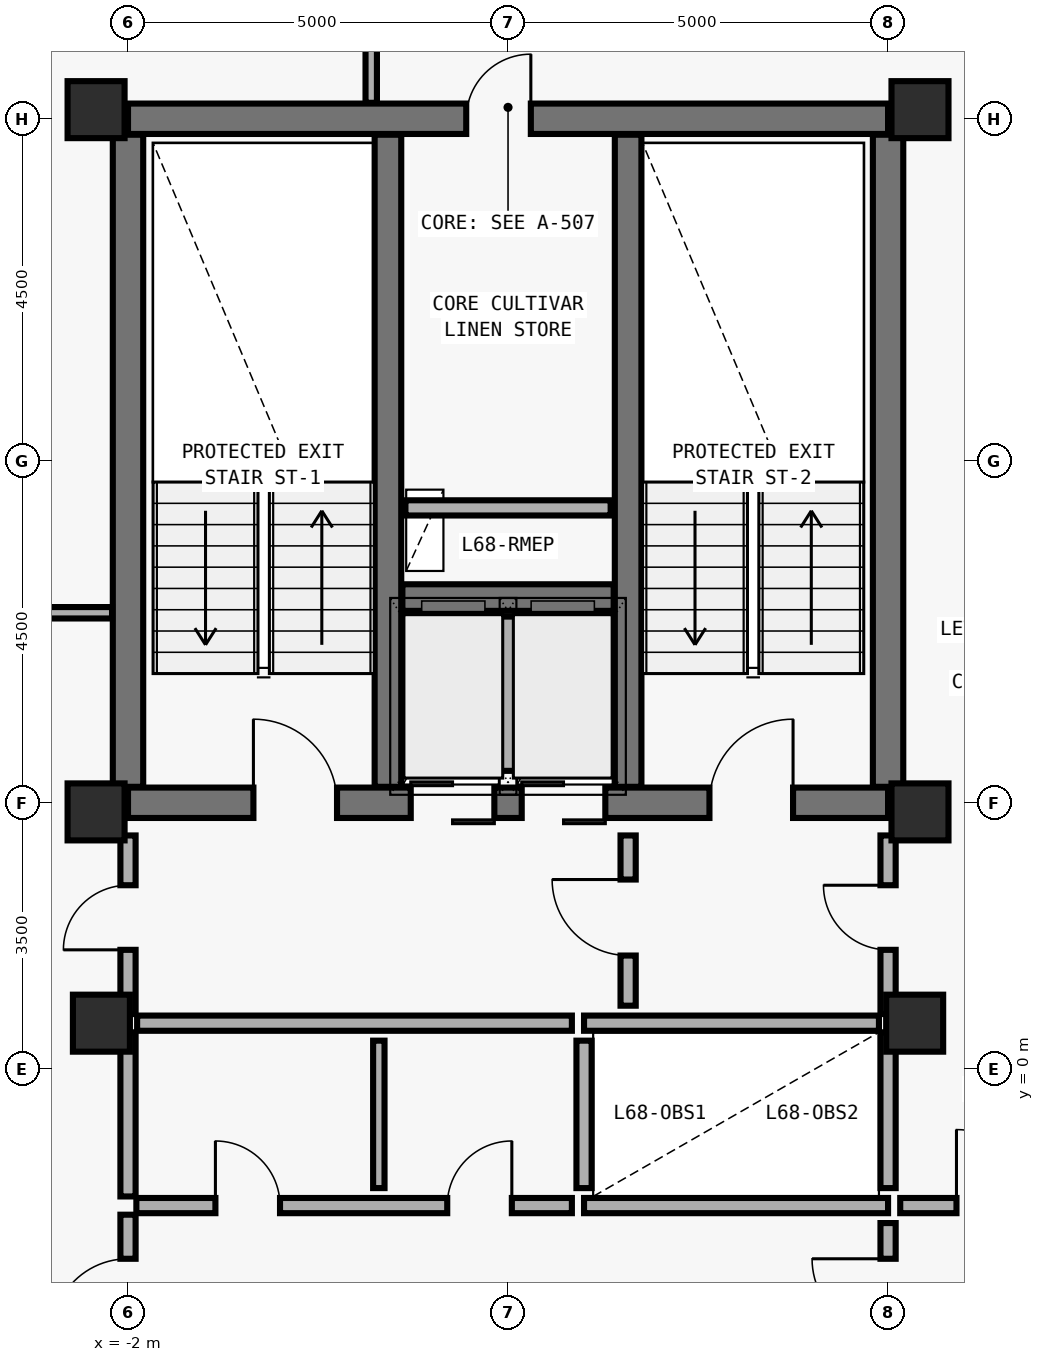
"""IFC4 building model, lengths in metres.
Left out: names, types, materials, properties, quantities, classifications, styles, units other than length and angle.
Written with IfcOpenShell. Run it as: python <this file> out.ifc"""

import sys

from ifc_helpers import new_model, si_unit, direction, frame, frame_2d, origin, origin_2d, place, context, subcontext, project, spatial, rectangle, extrude, element, fill, save


model = new_model("IFC4")
c1 = context("Model", 3, precision=1e-05, world=origin(), true_north=direction((0.0, 1.0)))
c2 = subcontext(c1, "Body", "Model", "MODEL_VIEW")
j1 = project(units=[si_unit("LENGTHUNIT", "METRE"), si_unit("PLANEANGLEUNIT", "RADIAN")], contexts=[c1])
p1 = place(None, origin())
s1 = spatial("IfcSite", under=j1, at=p1, CompositionType="ELEMENT")
p2 = place(p1, origin())
s2 = spatial("IfcBuilding", under=s1, at=p2, CompositionType="ELEMENT")
p3 = place(p2, frame((0.0, 0.0, 267.0)))
s3 = spatial("IfcBuildingStorey", under=s2, at=p3, CompositionType="ELEMENT", Elevation=267.0)
p4 = place(p3, frame((-2.0, 3.5, 0.0), z_axis=(0.0, 0.0, 1.0), x_axis=(1.0, 0.0, 0.0)))
e1 = element("IfcWall", 1, at=p4, inside=s3, PredefinedType="SHEAR", context=c2, shape_type="SweptSolid", body=[
    extrude(rectangle(XDim=10.0, YDim=0.4, at=frame_2d((5.0, 0.0))), origin(), (0.0, 0.0, 1.0), 3.592),
])
p5 = place(p4, frame((1.65, 0.0, 0.0)))
e2 = element("IfcOpeningElement", 2, at=p5, cuts=e1, PredefinedType="OPENING", context=c2, shape_type="SweptSolid", body=[
    extrude(rectangle(XDim=1.1, YDim=2.15, at=frame_2d((0.55, 1.075))), frame((0.0, 0.21, 0.0), z_axis=(0.0, -1.0, 0.0), x_axis=(1.0, 0.0, 0.0)), (0.0, 0.0, 1.0), 0.42),
])
p6 = place(p4, frame((7.65, 0.0, 0.0)))
e3 = element("IfcOpeningElement", 3, at=p6, cuts=e1, PredefinedType="OPENING", context=c2, shape_type="SweptSolid", body=[
    extrude(rectangle(XDim=1.1, YDim=2.15, at=frame_2d((0.55, 1.075))), frame((0.0, 0.21, 0.0), z_axis=(0.0, -1.0, 0.0), x_axis=(1.0, 0.0, 0.0)), (0.0, 0.0, 1.0), 0.42),
])
p7 = place(p4, frame((3.72, 0.0, 0.0)))
e4 = element("IfcOpeningElement", 4, at=p7, cuts=e1, PredefinedType="OPENING", context=c2, shape_type="SweptSolid", body=[
    extrude(rectangle(XDim=1.1, YDim=2.2, at=frame_2d((0.55, 1.1))), frame((0.0, 0.21, 0.0), z_axis=(0.0, -1.0, 0.0), x_axis=(1.0, 0.0, 0.0)), (0.0, 0.0, 1.0), 0.42),
])
p8 = place(p4, frame((5.18, 0.0, 0.0)))
e5 = element("IfcOpeningElement", 5, at=p8, cuts=e1, PredefinedType="OPENING", context=c2, shape_type="SweptSolid", body=[
    extrude(rectangle(XDim=1.1, YDim=2.2, at=frame_2d((0.55, 1.1))), frame((0.0, 0.21, 0.0), z_axis=(0.0, -1.0, 0.0), x_axis=(1.0, 0.0, 0.0)), (0.0, 0.0, 1.0), 0.42),
])
p9 = place(p3, frame((-2.0, 12.5, 0.0), z_axis=(0.0, 0.0, 1.0), x_axis=(1.0, 0.0, 0.0)))
e6 = element("IfcWall", 6, at=p9, inside=s3, PredefinedType="SHEAR", context=c2, shape_type="SweptSolid", body=[
    extrude(rectangle(XDim=10.0, YDim=0.4, at=frame_2d((5.0, 0.0))), origin(), (0.0, 0.0, 1.0), 3.592),
])
p10 = place(p9, frame((4.45, 0.0, 0.0)))
e7 = element("IfcOpeningElement", 7, at=p10, cuts=e6, PredefinedType="OPENING", context=c2, shape_type="SweptSolid", body=[
    extrude(rectangle(XDim=0.85, YDim=2.1, at=frame_2d((0.425, 1.05))), frame((0.0, 0.21, 0.0), z_axis=(0.0, -1.0, 0.0), x_axis=(1.0, 0.0, 0.0)), (0.0, 0.0, 1.0), 0.42),
])
for number, where, z_axis, x_axis in (
    (8, (-2.0, 3.71, 0.0), (0.0, 0.0, 1.0), (0.0, 1.0, 0.0)),
    (9, (8.0, 3.71, 0.0), (0.0, 0.0, 1.0), (0.0, 1.0, 0.0)),
):
    element("IfcWall", number, at=place(p3, frame(where, z_axis=z_axis, x_axis=x_axis)), inside=s3, PredefinedType="SHEAR", context=c2, shape_type="SweptSolid", body=[
        extrude(rectangle(XDim=8.58, YDim=0.4, at=frame_2d((4.29, 0.0))), origin(), (0.0, 0.0, 1.0), 3.592),
    ])
for number, where, z_axis, x_axis in (
    (10, (1.42, 3.71, 0.0), (0.0, 0.0, 1.0), (0.0, 1.0, 0.0)),
    (11, (4.58, 3.71, 0.0), (0.0, 0.0, 1.0), (0.0, 1.0, 0.0)),
):
    element("IfcWall", number, at=place(p3, frame(where, z_axis=z_axis, x_axis=x_axis)), inside=s3, PredefinedType="SHEAR", context=c2, shape_type="SweptSolid", body=[
        extrude(rectangle(XDim=8.58, YDim=0.35, at=frame_2d((4.29, 0.0))), origin(), (0.0, 0.0, 1.0), 3.592),
    ])
p11 = place(p3, frame((1.61, 6.2, 0.0), z_axis=(0.0, 0.0, 1.0), x_axis=(1.0, 0.0, 0.0)))
e12 = element("IfcWall", 12, at=p11, inside=s3, PredefinedType="SHEAR", context=c2, shape_type="SweptSolid", body=[
    extrude(rectangle(XDim=2.78, YDim=0.35, at=frame_2d((1.39, 0.0))), origin(), (0.0, 0.0, 1.0), 3.592),
])
for number, where, z_axis, x_axis in (
    (13, (-2.42, 12.62, 0.0), (0.0, 0.0, 1.0), (1.0, 0.0, 0.0)),
    (14, (8.42, 12.62, 0.0), (0.0, 0.0, 1.0), (1.0, 0.0, 0.0)),
    (15, (-2.42, 3.38, 0.0), (0.0, 0.0, 1.0), (1.0, 0.0, 0.0)),
    (16, (8.42, 3.38, 0.0), (0.0, 0.0, 1.0), (1.0, 0.0, 0.0)),
    (17, (-2.35, 0.6, 0.0), (0.0, 0.0, 1.0), (1.0, 0.0, 0.0)),
    (18, (8.35, 0.6, 0.0), (0.0, 0.0, 1.0), (1.0, 0.0, 0.0)),
):
    element("IfcColumn", number, at=place(p3, frame(where, z_axis=z_axis, x_axis=x_axis)), inside=s3, PredefinedType="COLUMN", context=c2, shape_type="SweptSolid", body=[
        extrude(rectangle(XDim=0.75, YDim=0.75, at=origin_2d()), origin(), (0.0, 0.0, 1.0), 3.575),
    ])
p12 = place(p3, frame((3.0, 3.92, 0.0), z_axis=(0.0, 0.0, 1.0), x_axis=(0.0, 1.0, 0.0)))
e19 = element("IfcWall", 19, at=p12, inside=s3, PredefinedType="SOLIDWALL", context=c2, shape_type="SweptSolid", body=[
    extrude(rectangle(XDim=2.03, YDim=0.2, at=frame_2d((1.015, 0.0))), origin(), (0.0, 0.0, 1.0), 3.36),
])
p13 = place(p3, frame((1.65, 7.38, 0.0), z_axis=(0.0, 0.0, 1.0), x_axis=(1.0, 0.0, 0.0)))
e20 = element("IfcWall", 20, at=p13, inside=s3, PredefinedType="SOLIDWALL", context=c2, shape_type="SweptSolid", body=[
    extrude(rectangle(XDim=2.7, YDim=0.2, at=frame_2d((1.35, 0.0))), origin(), (0.0, 0.0, 1.0), 3.36),
])
p14 = place(p3, frame((4.0, 0.6, 0.0), z_axis=(0.0, 0.0, 1.0), x_axis=(1.0, 0.0, 0.0)))
e21 = element("IfcWall", 21, at=p14, inside=s3, PredefinedType="SOLIDWALL", context=c2, shape_type="SweptSolid", body=[
    extrude(rectangle(XDim=3.88, YDim=0.2, at=frame_2d((1.94, 0.0))), origin(), (0.0, 0.0, 1.0), 3.072),
])
p15 = place(p3, frame((4.0, -1.8, 0.0), z_axis=(0.0, 0.0, 1.0), x_axis=(1.0, 0.0, 0.0)))
e22 = element("IfcWall", 22, at=p15, inside=s3, PredefinedType="SOLIDWALL", context=c2, shape_type="SweptSolid", body=[
    extrude(rectangle(XDim=4.0, YDim=0.2, at=frame_2d((2.0, 0.0))), origin(), (0.0, 0.0, 1.0), 3.36),
])
p16 = place(p3, frame((4.0, -1.57, 0.0), z_axis=(0.0, 0.0, 1.0), x_axis=(0.0, 1.0, 0.0)))
e23 = element("IfcWall", 23, at=p16, inside=s3, PredefinedType="SOLIDWALL", context=c2, shape_type="SweptSolid", body=[
    extrude(rectangle(XDim=1.94, YDim=0.2, at=frame_2d((0.97, 0.0))), origin(), (0.0, 0.0, 1.0), 3.36),
])
p17 = place(p3, frame((8.0, -1.57, 0.0), z_axis=(0.0, 0.0, 1.0), x_axis=(0.0, 1.0, 0.0)))
e24 = element("IfcWall", 24, at=p17, inside=s3, PredefinedType="SOLIDWALL", context=c2, shape_type="SweptSolid", body=[
    extrude(rectangle(XDim=2.05, YDim=0.2, at=frame_2d((1.025, 0.0))), origin(), (0.0, 0.0, 1.0), 3.072),
])
p18 = place(p3, frame((4.58, 0.83, 0.0), z_axis=(0.0, 0.0, 1.0), x_axis=(0.0, 1.0, 0.0)))
e25 = element("IfcWall", 25, at=p18, inside=s3, PredefinedType="MOVABLE", context=c2, shape_type="SweptSolid", body=[
    extrude(rectangle(XDim=2.24, YDim=0.2, at=frame_2d((1.12, 0.0))), origin(), (0.0, 0.0, 1.0), 3.36),
])
p19 = place(p18, frame((0.66, 0.0, 0.0)))
e26 = element("IfcOpeningElement", 26, at=p19, cuts=e25, PredefinedType="OPENING", context=c2, shape_type="SweptSolid", body=[
    extrude(rectangle(XDim=1.0, YDim=2.1, at=frame_2d((0.5, 1.05))), frame((0.0, 0.11, 0.0), z_axis=(0.0, -1.0, 0.0), x_axis=(1.0, 0.0, 0.0)), (0.0, 0.0, 1.0), 0.22),
])
p20 = place(p3, frame((-2.0, 0.72, 0.0), z_axis=(0.0, 0.0, 1.0), x_axis=(0.0, 1.0, 0.0)))
e27 = element("IfcWall", 27, at=p20, inside=s3, PredefinedType="MOVABLE", context=c2, shape_type="SweptSolid", body=[
    extrude(rectangle(XDim=2.35, YDim=0.2, at=frame_2d((1.175, 0.0))), origin(), (0.0, 0.0, 1.0), 2.692),
])
p21 = place(p20, frame((0.845, 0.0, 0.0)))
e28 = element("IfcOpeningElement", 28, at=p21, cuts=e27, PredefinedType="OPENING", context=c2, shape_type="SweptSolid", body=[
    extrude(rectangle(XDim=0.85, YDim=2.1, at=frame_2d((0.425, 1.05))), frame((0.0, 0.11, 0.0), z_axis=(0.0, -1.0, 0.0), x_axis=(1.0, 0.0, 0.0)), (0.0, 0.0, 1.0), 0.22),
])
p22 = place(p3, frame((8.0, 0.72, 0.0), z_axis=(0.0, 0.0, 1.0), x_axis=(0.0, 1.0, 0.0)))
e29 = element("IfcWall", 29, at=p22, inside=s3, PredefinedType="MOVABLE", context=c2, shape_type="SweptSolid", body=[
    extrude(rectangle(XDim=2.35, YDim=0.2, at=frame_2d((1.175, 0.0))), origin(), (0.0, 0.0, 1.0), 2.692),
])
p23 = place(p22, frame((0.845, 0.0, 0.0)))
e30 = element("IfcOpeningElement", 30, at=p23, cuts=e29, PredefinedType="OPENING", context=c2, shape_type="SweptSolid", body=[
    extrude(rectangle(XDim=0.85, YDim=2.1, at=frame_2d((0.425, 1.05))), frame((0.0, 0.11, 0.0), z_axis=(0.0, -1.0, 0.0), x_axis=(1.0, 0.0, 0.0)), (0.0, 0.0, 1.0), 0.22),
])
p24 = place(p3, frame((-2.0, -4.08, 0.0), z_axis=(0.0, 0.0, 1.0), x_axis=(0.0, 1.0, 0.0)))
e31 = element("IfcWall", 31, at=p24, inside=s3, PredefinedType="MOVABLE", context=c2, shape_type="SweptSolid", body=[
    extrude(rectangle(XDim=2.16, YDim=0.2, at=frame_2d((1.08, 0.0))), origin(), (0.0, 0.0, 1.0), 3.072),
])
p25 = place(p24, frame((0.58, 0.0, 0.0)))
e32 = element("IfcOpeningElement", 32, at=p25, cuts=e31, PredefinedType="OPENING", context=c2, shape_type="SweptSolid", body=[
    extrude(rectangle(XDim=1.0, YDim=2.1, at=frame_2d((0.5, 1.05))), frame((0.0, 0.11, 0.0), z_axis=(0.0, -1.0, 0.0), x_axis=(1.0, 0.0, 0.0)), (0.0, 0.0, 1.0), 0.22),
])
p26 = place(p3, frame((8.0, -3.97, 0.0), z_axis=(0.0, 0.0, 1.0), x_axis=(0.0, 1.0, 0.0)))
e33 = element("IfcWall", 33, at=p26, inside=s3, PredefinedType="MOVABLE", context=c2, shape_type="SweptSolid", body=[
    extrude(rectangle(XDim=1.94, YDim=0.2, at=frame_2d((0.97, 0.0))), origin(), (0.0, 0.0, 1.0), 3.072),
])
p27 = place(p26, frame((0.47, 0.0, 0.0)))
e34 = element("IfcOpeningElement", 34, at=p27, cuts=e33, PredefinedType="OPENING", context=c2, shape_type="SweptSolid", body=[
    extrude(rectangle(XDim=1.0, YDim=2.1, at=frame_2d((0.5, 1.05))), frame((0.0, 0.11, 0.0), z_axis=(0.0, -1.0, 0.0), x_axis=(1.0, 0.0, 0.0)), (0.0, 0.0, 1.0), 0.22),
])
p28 = place(p3, frame((-1.89, -1.8, 0.0), z_axis=(0.0, 0.0, 1.0), x_axis=(1.0, 0.0, 0.0)))
e35 = element("IfcWall", 35, at=p28, inside=s3, PredefinedType="MOVABLE", context=c2, shape_type="SweptSolid", body=[
    extrude(rectangle(XDim=5.73, YDim=0.2, at=frame_2d((2.865, 0.0))), origin(), (0.0, 0.0, 1.0), 3.36),
])
p29 = place(p28, frame((1.04, 0.0, 0.0)))
e36 = element("IfcOpeningElement", 36, at=p29, cuts=e35, PredefinedType="OPENING", context=c2, shape_type="SweptSolid", body=[
    extrude(rectangle(XDim=0.85, YDim=2.1, at=frame_2d((0.425, 1.05))), frame((0.0, 0.11, 0.0), z_axis=(0.0, -1.0, 0.0), x_axis=(1.0, 0.0, 0.0)), (0.0, 0.0, 1.0), 0.22),
])
p30 = place(p28, frame((4.09, 0.0, 0.0)))
e37 = element("IfcOpeningElement", 37, at=p30, cuts=e35, PredefinedType="OPENING", context=c2, shape_type="SweptSolid", body=[
    extrude(rectangle(XDim=0.85, YDim=2.1, at=frame_2d((0.425, 1.05))), frame((0.0, 0.11, 0.0), z_axis=(0.0, -1.0, 0.0), x_axis=(1.0, 0.0, 0.0)), (0.0, 0.0, 1.0), 0.22),
])
p31 = place(p3, frame((8.16, -1.8, 0.0), z_axis=(0.0, 0.0, 1.0), x_axis=(1.0, 0.0, 0.0)))
e38 = element("IfcWall", 38, at=p31, inside=s3, PredefinedType="MOVABLE", context=c2, shape_type="SweptSolid", body=[
    extrude(rectangle(XDim=2.64, YDim=0.2, at=frame_2d((1.32, 0.0))), origin(), (0.0, 0.0, 1.0), 3.36),
])
p32 = place(p31, frame((0.74, 0.0, 0.0)))
e39 = element("IfcOpeningElement", 39, at=p32, cuts=e38, PredefinedType="OPENING", context=c2, shape_type="SweptSolid", body=[
    extrude(rectangle(XDim=1.0, YDim=2.1, at=frame_2d((0.5, 1.05))), frame((0.0, 0.11, 0.0), z_axis=(0.0, -1.0, 0.0), x_axis=(1.0, 0.0, 0.0)), (0.0, 0.0, 1.0), 0.22),
])
p33 = place(p3, frame((-1.88, 0.6, 0.0), z_axis=(0.0, 0.0, 1.0), x_axis=(1.0, 0.0, 0.0)))
e40 = element("IfcWall", 40, at=p33, inside=s3, PredefinedType="MOVABLE", context=c2, shape_type="SweptSolid", body=[
    extrude(rectangle(XDim=5.72, YDim=0.2, at=frame_2d((2.86, 0.0))), origin(), (0.0, 0.0, 1.0), 3.072),
])
p34 = place(p3, frame((1.3, -1.57, 0.0), z_axis=(0.0, 0.0, 1.0), x_axis=(0.0, 1.0, 0.0)))
e41 = element("IfcWall", 41, at=p34, inside=s3, PredefinedType="PARTITIONING", context=c2, shape_type="SweptSolid", body=[
    extrude(rectangle(XDim=1.94, YDim=0.15, at=frame_2d((0.97, 0.0))), origin(), (0.0, 0.0, 1.0), 3.36),
])
p35 = place(p3, frame((-2.0, -1.68, 0.0), z_axis=(0.0, 0.0, 1.0), x_axis=(0.0, 1.0, 0.0)))
e42 = element("IfcWall", 42, at=p35, inside=s3, PredefinedType="MOVABLE", context=c2, shape_type="SweptSolid", body=[
    extrude(rectangle(XDim=2.16, YDim=0.2, at=frame_2d((1.08, 0.0))), origin(), (0.0, 0.0, 1.0), 3.072),
])
p36 = place(p3, frame((1.2, 14.615, 0.0), z_axis=(0.0, 0.0, 1.0), x_axis=(0.0, -1.0, 0.0)))
e43 = element("IfcWall", 43, at=p36, inside=s3, PredefinedType="PARTITIONING", context=c2, shape_type="SweptSolid", body=[
    extrude(rectangle(XDim=1.905, YDim=0.15, at=frame_2d((0.953, 0.0))), origin(), (0.0, 0.0, 1.0), 3.36),
])
p37 = place(p3, frame((-2.21, 6.0, 0.0), z_axis=(0.0, 0.0, 1.0), x_axis=(-1.0, 0.0, 0.0)))
e44 = element("IfcWall", 44, at=p37, inside=s3, PredefinedType="PARTITIONING", context=c2, shape_type="SweptSolid", body=[
    extrude(rectangle(XDim=2.39, YDim=0.15, at=frame_2d((1.195, 0.0))), origin(), (0.0, 0.0, 1.0), 3.36),
])
p38 = place(p5, origin())
e45 = element("IfcDoor", 45, at=p38, inside=s3, OperationType="SINGLE_SWING_LEFT", PredefinedType="DOOR", context=c2, shape_type="SweptSolid", body=[
    extrude(rectangle(XDim=1.1, YDim=2.15, at=frame_2d((0.55, 1.075))), frame((0.0, 0.025, 0.0), z_axis=(0.0, -1.0, 0.0), x_axis=(1.0, 0.0, 0.0)), (0.0, 0.0, 1.0), 0.05),
])
fill(e2, e45)
p39 = place(p6, origin())
e46 = element("IfcDoor", 46, at=p39, inside=s3, OperationType="SINGLE_SWING_RIGHT", PredefinedType="DOOR", context=c2, shape_type="SweptSolid", body=[
    extrude(rectangle(XDim=1.1, YDim=2.15, at=frame_2d((0.55, 1.075))), frame((0.0, 0.025, 0.0), z_axis=(0.0, -1.0, 0.0), x_axis=(1.0, 0.0, 0.0)), (0.0, 0.0, 1.0), 0.05),
])
fill(e3, e46)
p40 = place(p7, origin())
e47 = element("IfcDoor", 47, at=p40, inside=s3, OperationType="DOUBLE_DOOR_SLIDING", PredefinedType="DOOR", context=c2, shape_type="SweptSolid", body=[
    extrude(rectangle(XDim=1.1, YDim=2.2, at=frame_2d((0.55, 1.1))), frame((0.0, 0.025, 0.0), z_axis=(0.0, -1.0, 0.0), x_axis=(1.0, 0.0, 0.0)), (0.0, 0.0, 1.0), 0.05),
])
fill(e4, e47)
p41 = place(p8, origin())
e48 = element("IfcDoor", 48, at=p41, inside=s3, OperationType="DOUBLE_DOOR_SLIDING", PredefinedType="DOOR", context=c2, shape_type="SweptSolid", body=[
    extrude(rectangle(XDim=1.1, YDim=2.2, at=frame_2d((0.55, 1.1))), frame((0.0, 0.025, 0.0), z_axis=(0.0, -1.0, 0.0), x_axis=(1.0, 0.0, 0.0)), (0.0, 0.0, 1.0), 0.05),
])
fill(e5, e48)
p42 = place(p10, origin())
e49 = element("IfcDoor", 49, at=p42, inside=s3, OperationType="SINGLE_SWING_RIGHT", PredefinedType="DOOR", context=c2, shape_type="SweptSolid", body=[
    extrude(rectangle(XDim=0.85, YDim=2.1, at=frame_2d((0.425, 1.05))), frame((0.0, 0.025, 0.0), z_axis=(0.0, -1.0, 0.0), x_axis=(1.0, 0.0, 0.0)), (0.0, 0.0, 1.0), 0.05),
])
fill(e7, e49)
p43 = place(p19, origin())
e50 = element("IfcDoor", 50, at=p43, inside=s3, OperationType="SINGLE_SWING_RIGHT", PredefinedType="DOOR", context=c2, shape_type="SweptSolid", body=[
    extrude(rectangle(XDim=1.0, YDim=2.1, at=frame_2d((0.5, 1.05))), frame((0.0, 0.025, 0.0), z_axis=(0.0, -1.0, 0.0), x_axis=(1.0, 0.0, 0.0)), (0.0, 0.0, 1.0), 0.05),
])
fill(e26, e50)
p44 = place(p21, origin())
e51 = element("IfcDoor", 51, at=p44, inside=s3, OperationType="SINGLE_SWING_LEFT", PredefinedType="DOOR", context=c2, shape_type="SweptSolid", body=[
    extrude(rectangle(XDim=0.85, YDim=2.1, at=frame_2d((0.425, 1.05))), frame((0.0, 0.025, 0.0), z_axis=(0.0, -1.0, 0.0), x_axis=(1.0, 0.0, 0.0)), (0.0, 0.0, 1.0), 0.05),
])
fill(e28, e51)
p45 = place(p23, origin())
e52 = element("IfcDoor", 52, at=p45, inside=s3, OperationType="SINGLE_SWING_RIGHT", PredefinedType="DOOR", context=c2, shape_type="SweptSolid", body=[
    extrude(rectangle(XDim=0.85, YDim=2.1, at=frame_2d((0.425, 1.05))), frame((0.0, 0.025, 0.0), z_axis=(0.0, -1.0, 0.0), x_axis=(1.0, 0.0, 0.0)), (0.0, 0.0, 1.0), 0.05),
])
fill(e30, e52)
p46 = place(p25, origin())
e53 = element("IfcDoor", 53, at=p46, inside=s3, OperationType="SINGLE_SWING_LEFT", PredefinedType="DOOR", context=c2, shape_type="SweptSolid", body=[
    extrude(rectangle(XDim=1.0, YDim=2.1, at=frame_2d((0.5, 1.05))), frame((0.0, 0.025, 0.0), z_axis=(0.0, -1.0, 0.0), x_axis=(1.0, 0.0, 0.0)), (0.0, 0.0, 1.0), 0.05),
])
fill(e32, e53)
p47 = place(p27, origin())
e54 = element("IfcDoor", 54, at=p47, inside=s3, OperationType="SINGLE_SWING_RIGHT", PredefinedType="DOOR", context=c2, shape_type="SweptSolid", body=[
    extrude(rectangle(XDim=1.0, YDim=2.1, at=frame_2d((0.5, 1.05))), frame((0.0, 0.025, 0.0), z_axis=(0.0, -1.0, 0.0), x_axis=(1.0, 0.0, 0.0)), (0.0, 0.0, 1.0), 0.05),
])
fill(e34, e54)
p48 = place(p29, origin())
e55 = element("IfcDoor", 55, at=p48, inside=s3, OperationType="SINGLE_SWING_LEFT", PredefinedType="DOOR", context=c2, shape_type="SweptSolid", body=[
    extrude(rectangle(XDim=0.85, YDim=2.1, at=frame_2d((0.425, 1.05))), frame((0.0, 0.025, 0.0), z_axis=(0.0, -1.0, 0.0), x_axis=(1.0, 0.0, 0.0)), (0.0, 0.0, 1.0), 0.05),
])
fill(e36, e55)
p49 = place(p30, origin())
e56 = element("IfcDoor", 56, at=p49, inside=s3, OperationType="SINGLE_SWING_RIGHT", PredefinedType="DOOR", context=c2, shape_type="SweptSolid", body=[
    extrude(rectangle(XDim=0.85, YDim=2.1, at=frame_2d((0.425, 1.05))), frame((0.0, 0.025, 0.0), z_axis=(0.0, -1.0, 0.0), x_axis=(1.0, 0.0, 0.0)), (0.0, 0.0, 1.0), 0.05),
])
fill(e37, e56)
p50 = place(p32, origin())
e57 = element("IfcDoor", 57, at=p50, inside=s3, OperationType="SINGLE_SWING_LEFT", PredefinedType="DOOR", context=c2, shape_type="SweptSolid", body=[
    extrude(rectangle(XDim=1.0, YDim=2.1, at=frame_2d((0.5, 1.05))), frame((0.0, 0.025, 0.0), z_axis=(0.0, -1.0, 0.0), x_axis=(1.0, 0.0, 0.0)), (0.0, 0.0, 1.0), 0.05),
])
fill(e39, e57)
save(model, sys.argv[1])
